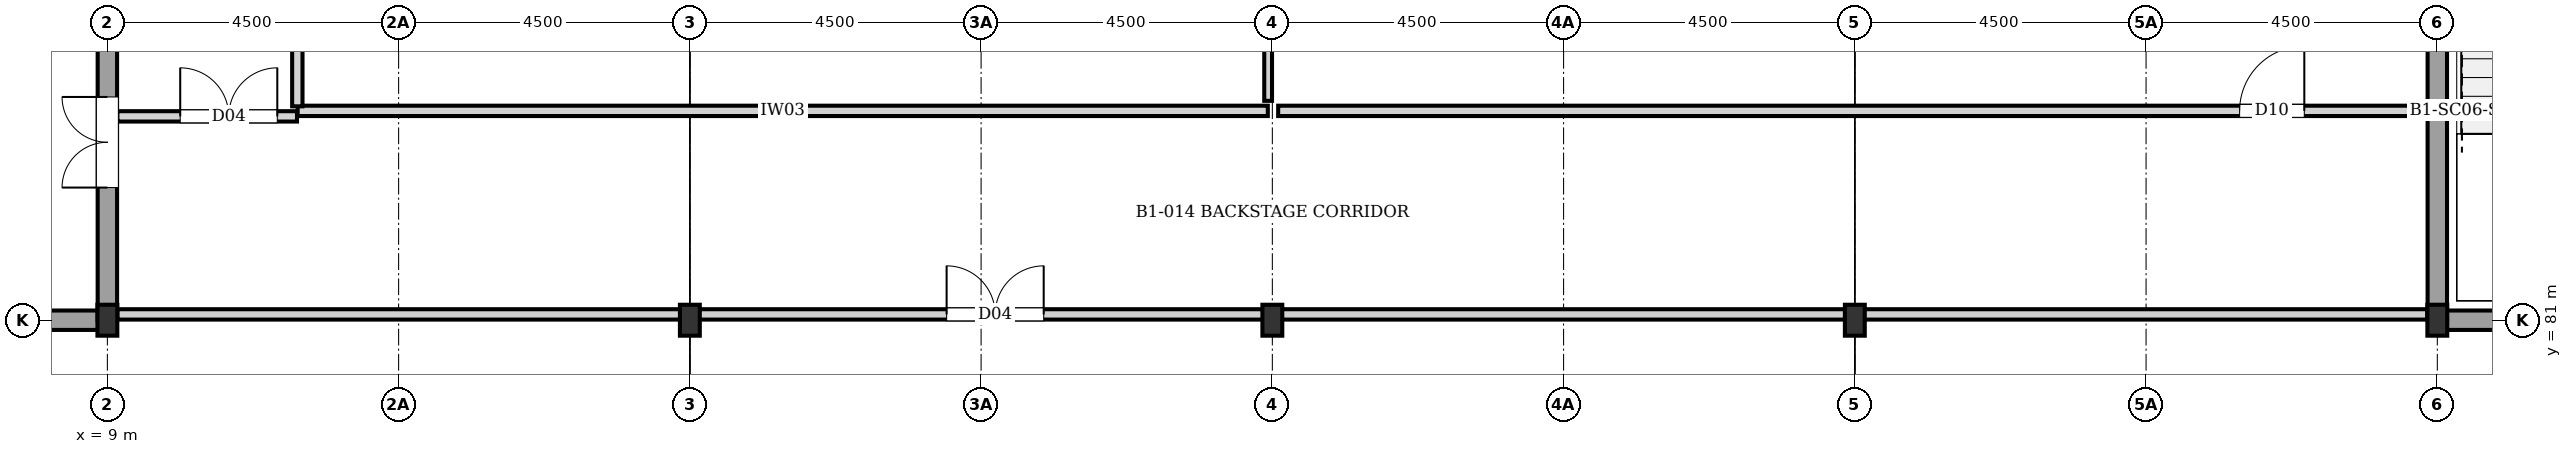
"""IFC4 building model, lengths in metres.
Left out: names, types, materials, properties, quantities, classifications, styles, units other than length and angle.
Written with IfcOpenShell. Run it as: python <this file> out.ifc"""

import sys

from ifc_helpers import new_model, si_unit, direction, frame, frame_2d, origin, origin_2d, place, context, subcontext, project, spatial, rectangle, i_section, extrude, element, fill, save


model = new_model("IFC4")
c1 = context("Model", 3, precision=1e-05, world=origin(), true_north=direction((0.0, 1.0)))
c2 = subcontext(c1, "Body", "Model", "MODEL_VIEW")
j1 = project(units=[si_unit("LENGTHUNIT", "METRE"), si_unit("PLANEANGLEUNIT", "RADIAN")], contexts=[c1])
p1 = place(None, origin())
s1 = spatial("IfcSite", under=j1, at=p1, CompositionType="ELEMENT")
p2 = place(p1, origin())
s2 = spatial("IfcBuilding", under=s1, at=p2, CompositionType="ELEMENT")
p3 = place(p2, frame((0.0, 0.0, -4.48)))
s3 = spatial("IfcBuildingStorey", under=s2, at=p3, CompositionType="ELEMENT", Elevation=-4.48)
for number, where, z_axis, x_axis in (
    (1, (9.0, 81.0, 0.0), (0.0, 0.0, 1.0), (1.0, 0.0, 0.0)),
    (2, (18.0, 81.0, 0.0), (0.0, 0.0, 1.0), (1.0, 0.0, 0.0)),
    (3, (27.0, 81.0, 0.0), (0.0, 0.0, 1.0), (1.0, 0.0, 0.0)),
    (4, (36.0, 81.0, 0.0), (0.0, 0.0, 1.0), (1.0, 0.0, 0.0)),
    (5, (45.0, 81.0, 0.0), (0.0, 0.0, 1.0), (1.0, 0.0, 0.0)),
):
    element("IfcColumn", number, at=place(p3, frame(where, z_axis=z_axis, x_axis=x_axis)), inside=s3, PredefinedType="COLUMN", context=c2, shape_type="SweptSolid", body=[
        extrude(i_section(OverallWidth=0.307, OverallDepth=0.478, WebThickness=0.021, FlangeThickness=0.04, at=origin_2d()), origin(), (0.0, 0.0, 1.0), 4.48),
    ])
p4 = place(p3, frame((0.0, 81.0, 0.0), z_axis=(0.0, 0.0, 1.0), x_axis=(1.0, 0.0, 0.0)))
e6 = element("IfcWall", 6, at=p4, inside=s3, PredefinedType="SHEAR", context=c2, shape_type="SweptSolid", body=[
    extrude(rectangle(XDim=9.0, YDim=0.3, at=frame_2d((4.5, 0.0))), origin(), (0.0, 0.0, 1.0), 4.18),
])
p5 = place(p3, frame((9.0, 81.0, 0.0), z_axis=(0.0, 0.0, 1.0), x_axis=(0.0, 1.0, 0.0)))
e7 = element("IfcWall", 7, at=p5, inside=s3, PredefinedType="SHEAR", context=c2, shape_type="SweptSolid", body=[
    extrude(rectangle(XDim=9.0, YDim=0.3, at=frame_2d((4.5, 0.0))), origin(), (0.0, 0.0, 1.0), 4.18),
])
p6 = place(p5, frame((2.05, 0.0, 0.0)))
e8 = element("IfcOpeningElement", 8, at=p6, cuts=e7, PredefinedType="OPENING", context=c2, shape_type="SweptSolid", body=[
    extrude(rectangle(XDim=1.4, YDim=2.02, at=frame_2d((0.7, 1.01))), frame((0.0, 0.16, 0.0), z_axis=(0.0, -1.0, 0.0), x_axis=(1.0, 0.0, 0.0)), (0.0, 0.0, 1.0), 0.32),
])
for number, where, z_axis, x_axis in (
    (9, (45.0, 81.0, 0.0), (0.0, 0.0, 1.0), (1.0, 0.0, 0.0)),
    (10, (45.0, 81.0, 0.0), (0.0, 0.0, 1.0), (0.0, 1.0, 0.0)),
):
    element("IfcWall", number, at=place(p3, frame(where, z_axis=z_axis, x_axis=x_axis)), inside=s3, PredefinedType="SHEAR", context=c2, shape_type="SweptSolid", body=[
        extrude(rectangle(XDim=9.0, YDim=0.3, at=frame_2d((4.5, 0.0))), origin(), (0.0, 0.0, 1.0), 4.18),
    ])
p7 = place(p3, frame((11.94, 84.235, 0.0), z_axis=(0.0, 0.0, 1.0), x_axis=(1.0, 0.0, 0.0)))
e11 = element("IfcWall", 11, at=p7, inside=s3, PredefinedType="PARTITIONING", context=c2, shape_type="SweptSolid", body=[
    extrude(rectangle(XDim=14.99, YDim=0.16, at=frame_2d((7.495, 0.0))), origin(), (0.0, 0.0, 1.0), 4.18),
])
p8 = place(p3, frame((26.935, 84.39, 0.0), z_axis=(0.0, 0.0, 1.0), x_axis=(0.0, 1.0, 0.0)))
e12 = element("IfcWall", 12, at=p8, inside=s3, PredefinedType="PARTITIONING", context=c2, shape_type="SweptSolid", body=[
    extrude(rectangle(XDim=23.63, YDim=0.12, at=frame_2d((11.815, 0.0))), origin(), (0.0, 0.0, 1.0), 3.28),
])
p9 = place(p3, frame((9.155, 84.15, 0.0), z_axis=(0.0, 0.0, 1.0), x_axis=(1.0, 0.0, 0.0)))
e13 = element("IfcWall", 13, at=p9, inside=s3, PredefinedType="PARTITIONING", context=c2, shape_type="SweptSolid", body=[
    extrude(rectangle(XDim=2.775, YDim=0.16, at=frame_2d((1.387, 0.0))), origin(), (0.0, 0.0, 1.0), 4.18),
])
p10 = place(p9, frame((0.97, 0.0, 0.0)))
e14 = element("IfcOpeningElement", 14, at=p10, cuts=e13, PredefinedType="OPENING", context=c2, shape_type="SweptSolid", body=[
    extrude(rectangle(XDim=1.5, YDim=2.1, at=frame_2d((0.75, 1.05))), frame((0.0, 0.09, 0.0), z_axis=(0.0, -1.0, 0.0), x_axis=(1.0, 0.0, 0.0)), (0.0, 0.0, 1.0), 0.18),
])
p11 = place(p3, frame((27.09, 84.235, 0.0), z_axis=(0.0, 0.0, 1.0), x_axis=(1.0, 0.0, 0.0)))
e15 = element("IfcWall", 15, at=p11, inside=s3, PredefinedType="PARTITIONING", context=c2, shape_type="SweptSolid", body=[
    extrude(rectangle(XDim=17.755, YDim=0.16, at=frame_2d((8.877, 0.0))), origin(), (0.0, 0.0, 1.0), 4.18),
])
p12 = place(p11, frame((14.855, 0.0, 0.0)))
e16 = element("IfcOpeningElement", 16, at=p12, cuts=e15, PredefinedType="OPENING", context=c2, shape_type="SweptSolid", body=[
    extrude(rectangle(XDim=1.0, YDim=2.1, at=frame_2d((0.5, 1.05))), frame((0.0, 0.09, 0.0), z_axis=(0.0, -1.0, 0.0), x_axis=(1.0, 0.0, 0.0)), (0.0, 0.0, 1.0), 0.18),
])
p13 = place(p3, frame((9.155, 81.09, 0.0), z_axis=(0.0, 0.0, 1.0), x_axis=(1.0, 0.0, 0.0)))
e17 = element("IfcWall", 17, at=p13, inside=s3, PredefinedType="PARTITIONING", context=c2, shape_type="SweptSolid", body=[
    extrude(rectangle(XDim=35.69, YDim=0.16, at=frame_2d((17.845, 0.0))), origin(), (0.0, 0.0, 1.0), 3.28),
])
p14 = place(p13, frame((12.812, 0.0, 0.0)))
e18 = element("IfcOpeningElement", 18, at=p14, cuts=e17, PredefinedType="OPENING", context=c2, shape_type="SweptSolid", body=[
    extrude(rectangle(XDim=1.5, YDim=2.1, at=frame_2d((0.75, 1.05))), frame((0.0, 0.09, 0.0), z_axis=(0.0, -1.0, 0.0), x_axis=(1.0, 0.0, 0.0)), (0.0, 0.0, 1.0), 0.18),
])
p15 = place(p3, frame((11.935, 84.305, 0.0), z_axis=(0.0, 0.0, 1.0), x_axis=(0.0, 1.0, 0.0)))
e19 = element("IfcWall", 19, at=p15, inside=s3, PredefinedType="PARTITIONING", context=c2, shape_type="SweptSolid", body=[
    extrude(rectangle(XDim=29.365, YDim=0.16, at=frame_2d((14.683, 0.0))), origin(), (0.0, 0.0, 1.0), 4.18),
])
p16 = place(p15, frame((10.659, 0.0, 0.0)))
e20 = element("IfcOpeningElement", 20, at=p16, cuts=e19, PredefinedType="OPENING", context=c2, shape_type="SweptSolid", body=[
    extrude(rectangle(XDim=1.0, YDim=2.1, at=frame_2d((0.5, 1.05))), frame((0.0, 0.09, 0.0), z_axis=(0.0, -1.0, 0.0), x_axis=(1.0, 0.0, 0.0)), (0.0, 0.0, 1.0), 0.18),
])
p17 = place(p6, origin())
e21 = element("IfcDoor", 21, at=p17, inside=s3, OperationType="DOUBLE_DOOR_SINGLE_SWING", PredefinedType="DOOR", context=c2, shape_type="SweptSolid", body=[
    extrude(rectangle(XDim=1.4, YDim=2.02, at=frame_2d((0.7, 1.01))), frame((0.0, 0.025, 0.0), z_axis=(0.0, -1.0, 0.0), x_axis=(1.0, 0.0, 0.0)), (0.0, 0.0, 1.0), 0.05),
])
fill(e8, e21)
p18 = place(p10, origin())
e22 = element("IfcDoor", 22, at=p18, inside=s3, OperationType="DOUBLE_DOOR_SINGLE_SWING", PredefinedType="DOOR", context=c2, shape_type="SweptSolid", body=[
    extrude(rectangle(XDim=1.5, YDim=2.1, at=frame_2d((0.75, 1.05))), frame((0.0, 0.025, 0.0), z_axis=(0.0, -1.0, 0.0), x_axis=(1.0, 0.0, 0.0)), (0.0, 0.0, 1.0), 0.05),
])
fill(e14, e22)
p19 = place(p12, origin())
e23 = element("IfcDoor", 23, at=p19, inside=s3, OperationType="SINGLE_SWING_RIGHT", PredefinedType="DOOR", context=c2, shape_type="SweptSolid", body=[
    extrude(rectangle(XDim=1.0, YDim=2.1, at=frame_2d((0.5, 1.05))), frame((0.0, 0.025, 0.0), z_axis=(0.0, -1.0, 0.0), x_axis=(1.0, 0.0, 0.0)), (0.0, 0.0, 1.0), 0.05),
])
fill(e16, e23)
p20 = place(p14, origin())
e24 = element("IfcDoor", 24, at=p20, inside=s3, OperationType="DOUBLE_DOOR_SINGLE_SWING", PredefinedType="DOOR", context=c2, shape_type="SweptSolid", body=[
    extrude(rectangle(XDim=1.5, YDim=2.1, at=frame_2d((0.75, 1.05))), frame((0.0, 0.025, 0.0), z_axis=(0.0, -1.0, 0.0), x_axis=(1.0, 0.0, 0.0)), (0.0, 0.0, 1.0), 0.05),
])
fill(e18, e24)
save(model, sys.argv[1])
